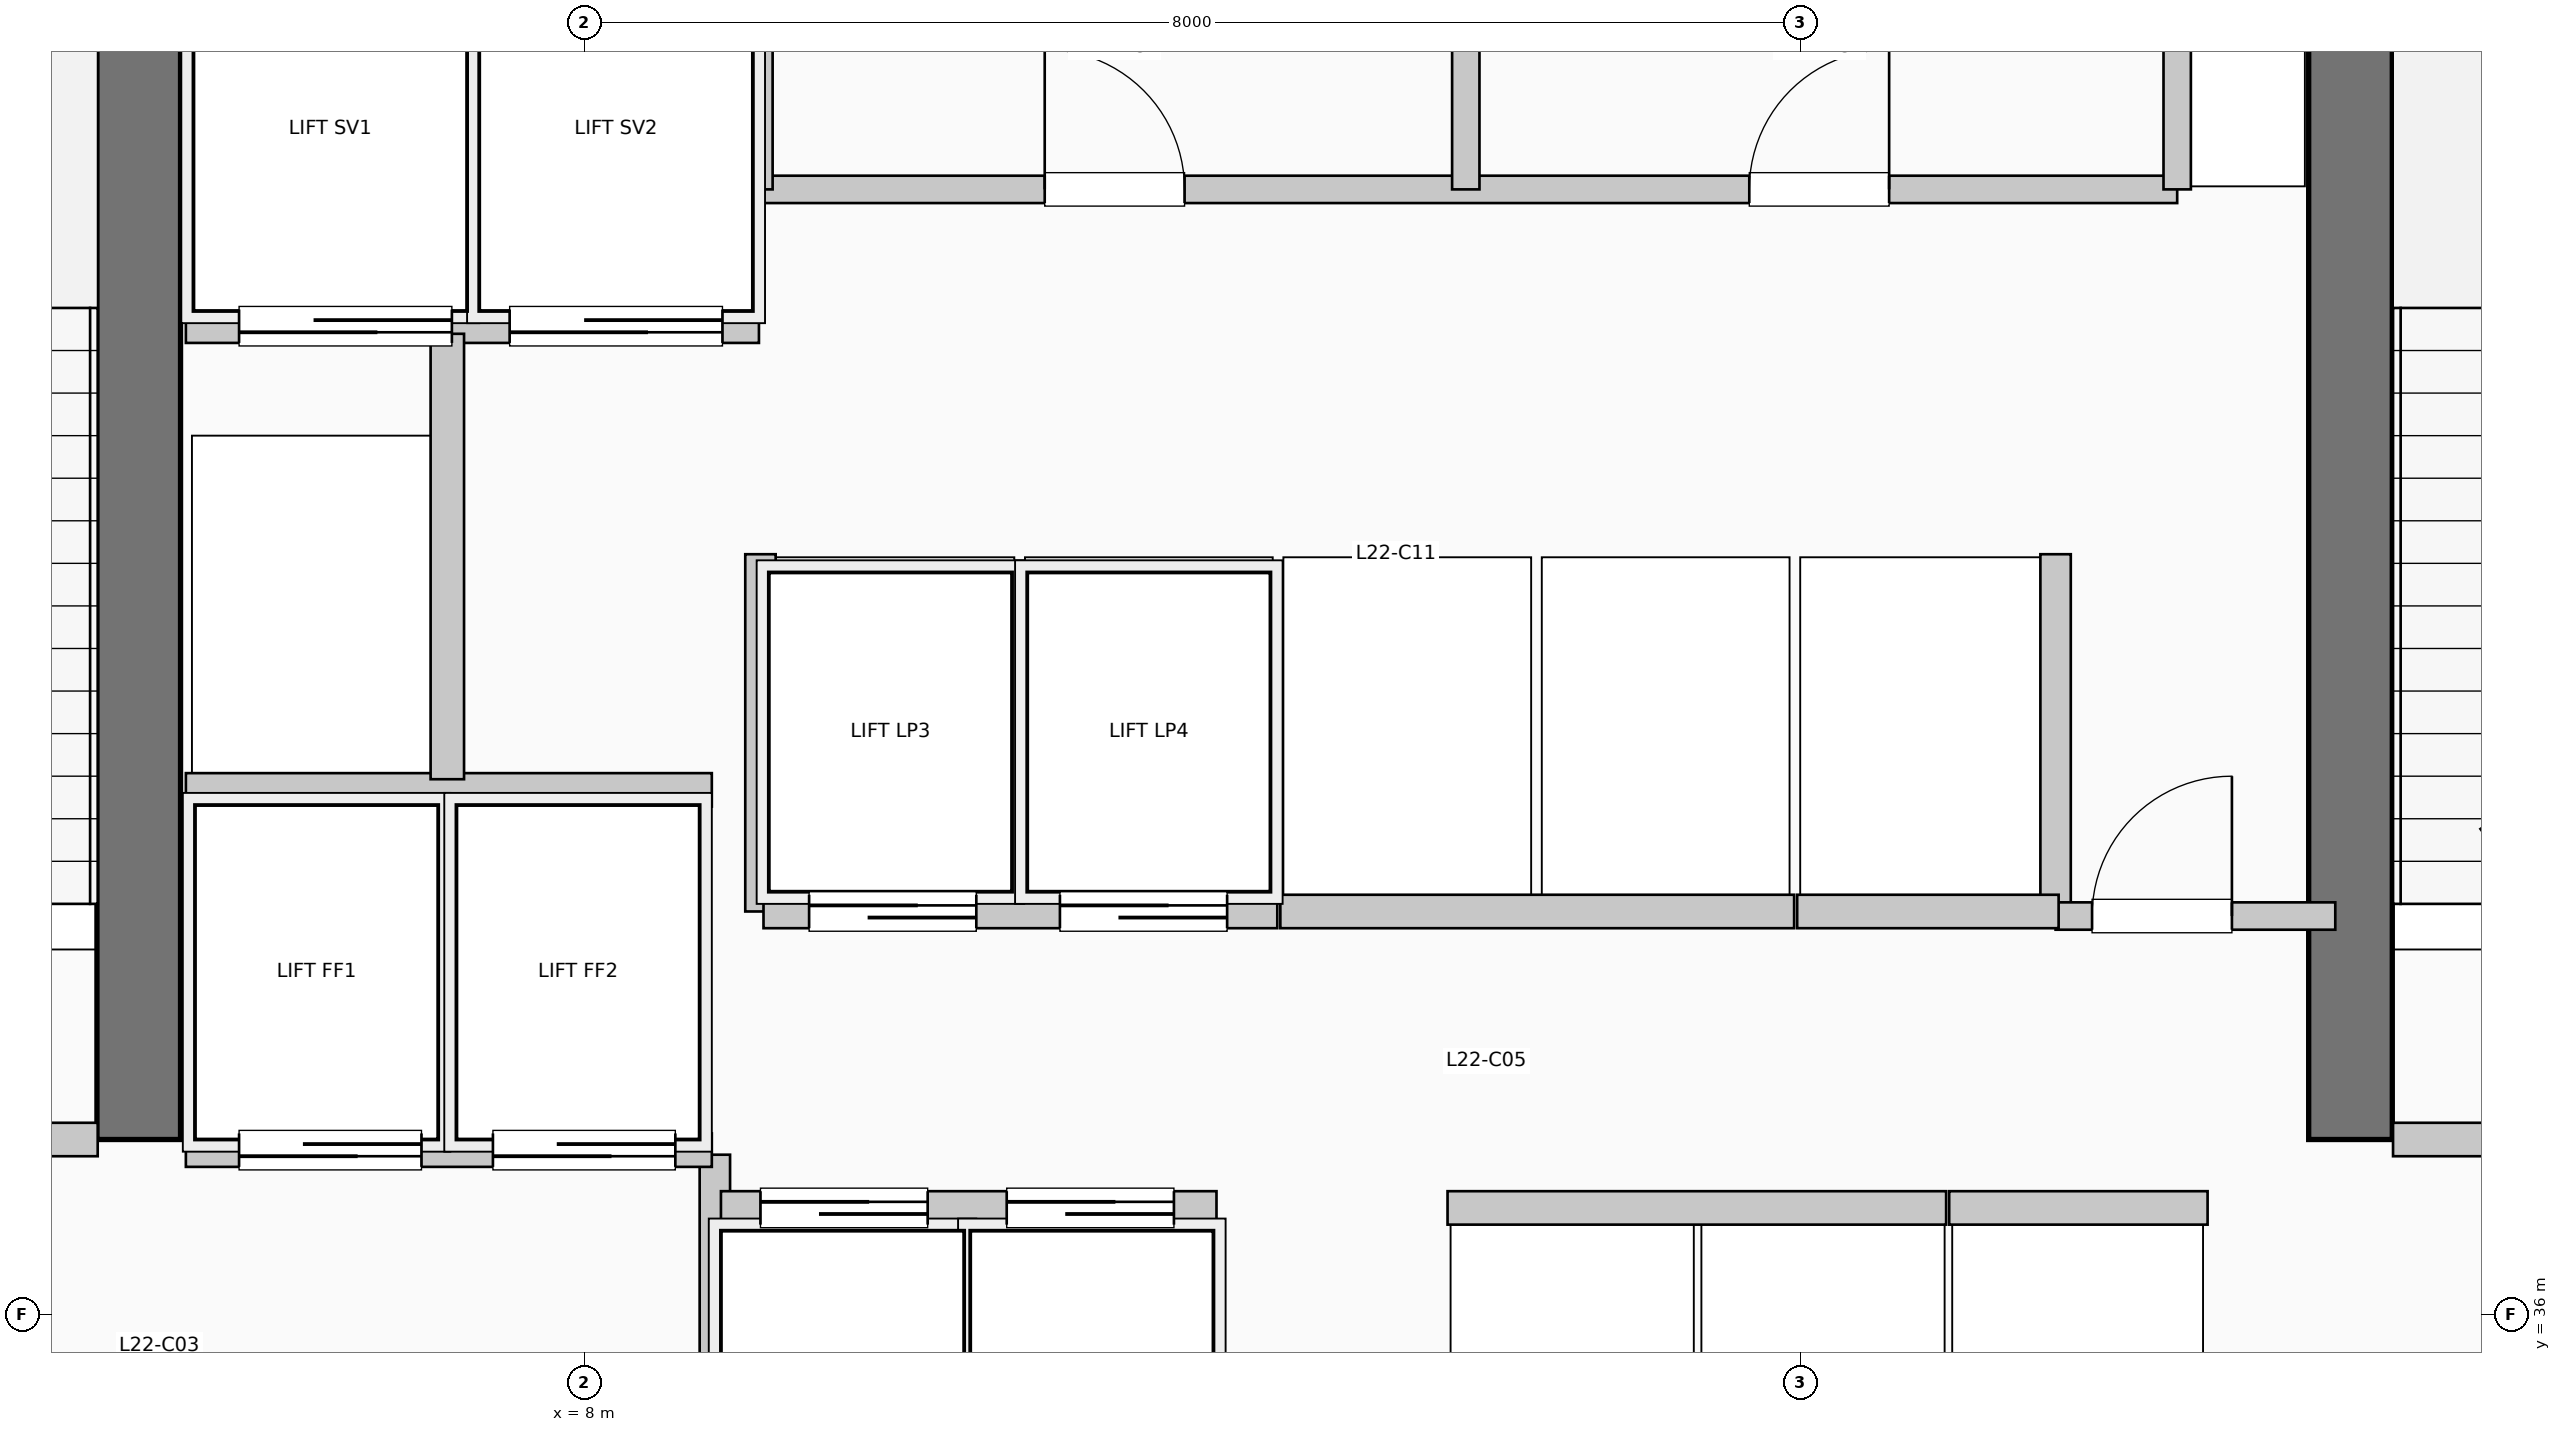
"""IFC4 building model, lengths in metres.
Left out: names, types, materials, properties, quantities, classifications, styles, units other than length and angle.
Written with IfcOpenShell. Run it as: python <this file> out.ifc"""

import sys

from ifc_helpers import new_model, si_unit, direction, frame, frame_2d, origin, place, context, subcontext, project, spatial, rectangle, extrude, element, fill, save


model = new_model("IFC4")
c1 = context("Model", 3, precision=1e-05, world=origin(), true_north=direction((0.0, 1.0)))
c2 = subcontext(c1, "Body", "Model", "MODEL_VIEW")
j1 = project(units=[si_unit("LENGTHUNIT", "METRE"), si_unit("PLANEANGLEUNIT", "RADIAN")], contexts=[c1])
p1 = place(None, origin())
s1 = spatial("IfcSite", under=j1, at=p1, CompositionType="ELEMENT")
p2 = place(p1, origin())
s2 = spatial("IfcBuilding", under=s1, at=p2, CompositionType="ELEMENT")
p3 = place(p2, frame((0.0, 0.0, 93.72)))
s3 = spatial("IfcBuildingStorey", under=s2, at=p3, CompositionType="ELEMENT", Elevation=93.72)
for number, where, z_axis, x_axis in (
    (1, (5.07, 37.15, 0.0), (0.0, 0.0, 1.0), (0.0, 1.0, 0.0)),
    (2, (19.62, 37.15, 0.0), (0.0, 0.0, 1.0), (0.0, 1.0, 0.0)),
):
    element("IfcWall", number, at=place(p3, frame(where, z_axis=z_axis, x_axis=x_axis)), inside=s3, PredefinedType="SHEAR", context=c2, shape_type="SweptSolid", body=[
        extrude(rectangle(XDim=7.89, YDim=0.55, at=frame_2d((3.945, 0.0))), origin(), (0.0, 0.0, 1.0), 4.95),
    ])
p4 = place(p3, frame((1.65, 37.15, 0.0), z_axis=(0.0, 0.0, 1.0), x_axis=(1.0, 0.0, 0.0)))
e3 = element("IfcWall", 3, at=p4, inside=s3, PredefinedType="PARTITIONING", context=c2, shape_type="SweptSolid", body=[
    extrude(rectangle(XDim=3.15, YDim=0.22, at=frame_2d((1.575, 0.0))), origin(), (0.0, 0.0, 1.0), 4.7),
])
p5 = place(p4, frame((2.05, 0.0, 0.0), z_axis=(0.0, 0.0, 1.0), x_axis=(-1.0, 0.0, 0.0)))
e4 = element("IfcOpeningElement", 4, at=p5, cuts=e3, PredefinedType="OPENING", context=c2, shape_type="SweptSolid", body=[
    extrude(rectangle(XDim=1.05, YDim=2.15, at=frame_2d((0.525, 1.075))), frame((0.0, 0.12, 0.0), z_axis=(0.0, -1.0, 0.0), x_axis=(1.0, 0.0, 0.0)), (0.0, 0.0, 1.0), 0.24),
])
p6 = place(p3, frame((8.86, 34.55, 0.0), z_axis=(0.0, 0.0, 1.0), x_axis=(0.0, 1.0, 0.0)))
e5 = element("IfcWall", 5, at=p6, inside=s3, PredefinedType="PARTITIONING", context=c2, shape_type="SweptSolid", body=[
    extrude(rectangle(XDim=2.5, YDim=0.2, at=frame_2d((1.25, 0.0))), origin(), (0.0, 0.0, 1.0), 4.7),
])
p7 = place(p3, frame((19.9, 37.15, 0.0), z_axis=(0.0, 0.0, 1.0), x_axis=(1.0, 0.0, 0.0)))
e6 = element("IfcWall", 6, at=p7, inside=s3, PredefinedType="PARTITIONING", context=c2, shape_type="SweptSolid", body=[
    extrude(rectangle(XDim=3.15, YDim=0.22, at=frame_2d((1.575, 0.0))), origin(), (0.0, 0.0, 1.0), 4.7),
])
p8 = place(p7, frame((2.05, 0.0, 0.0), z_axis=(0.0, 0.0, 1.0), x_axis=(-1.0, 0.0, 0.0)))
e7 = element("IfcOpeningElement", 7, at=p8, cuts=e6, PredefinedType="OPENING", context=c2, shape_type="SweptSolid", body=[
    extrude(rectangle(XDim=1.05, YDim=2.15, at=frame_2d((0.525, 1.075))), frame((0.0, 0.12, 0.0), z_axis=(0.0, -1.0, 0.0), x_axis=(1.0, 0.0, 0.0)), (0.0, 0.0, 1.0), 0.24),
])
p9 = place(p3, frame((5.38, 37.08, 0.0), z_axis=(0.0, 0.0, 1.0), x_axis=(1.0, 0.0, 0.0)))
e8 = element("IfcWall", 8, at=p9, inside=s3, PredefinedType="PARTITIONING", context=c2, shape_type="SweptSolid", body=[
    extrude(rectangle(XDim=3.46, YDim=0.22, at=frame_2d((1.73, 0.0))), origin(), (0.0, 0.0, 1.0), 4.7),
])
p10 = place(p9, frame((1.55, 0.0, 0.0), z_axis=(0.0, 0.0, 1.0), x_axis=(-1.0, 0.0, 0.0)))
e9 = element("IfcOpeningElement", 9, at=p10, cuts=e8, PredefinedType="OPENING", context=c2, shape_type="SweptSolid", body=[
    extrude(rectangle(XDim=1.2, YDim=2.2, at=frame_2d((0.6, 1.1))), frame((0.0, 0.12, 0.0), z_axis=(0.0, -1.0, 0.0), x_axis=(1.0, 0.0, 0.0)), (0.0, 0.0, 1.0), 0.24),
])
p11 = place(p9, frame((3.22, 0.0, 0.0), z_axis=(0.0, 0.0, 1.0), x_axis=(-1.0, 0.0, 0.0)))
e10 = element("IfcOpeningElement", 10, at=p11, cuts=e8, PredefinedType="OPENING", context=c2, shape_type="SweptSolid", body=[
    extrude(rectangle(XDim=1.2, YDim=2.2, at=frame_2d((0.6, 1.1))), frame((0.0, 0.12, 0.0), z_axis=(0.0, -1.0, 0.0), x_axis=(1.0, 0.0, 0.0)), (0.0, 0.0, 1.0), 0.24),
])
p12 = place(p3, frame((5.38, 39.45, 0.0), z_axis=(0.0, 0.0, 1.0), x_axis=(1.0, 0.0, 0.0)))
e11 = element("IfcWall", 11, at=p12, inside=s3, PredefinedType="PARTITIONING", context=c2, shape_type="SweptSolid", body=[
    extrude(rectangle(XDim=3.46, YDim=0.22, at=frame_2d((1.73, 0.0))), origin(), (0.0, 0.0, 1.0), 4.7),
])
p13 = place(p3, frame((5.38, 42.5, 0.0), z_axis=(0.0, 0.0, 1.0), x_axis=(1.0, 0.0, 0.0)))
e12 = element("IfcWall", 12, at=p13, inside=s3, PredefinedType="PARTITIONING", context=c2, shape_type="SweptSolid", body=[
    extrude(rectangle(XDim=3.77, YDim=0.22, at=frame_2d((1.885, 0.0))), origin(), (0.0, 0.0, 1.0), 4.7),
])
p14 = place(p13, frame((1.75, 0.0, 0.0), z_axis=(0.0, 0.0, 1.0), x_axis=(-1.0, 0.0, 0.0)))
e13 = element("IfcOpeningElement", 13, at=p14, cuts=e12, PredefinedType="OPENING", context=c2, shape_type="SweptSolid", body=[
    extrude(rectangle(XDim=1.4, YDim=2.2, at=frame_2d((0.7, 1.1))), frame((0.0, 0.12, 0.0), z_axis=(0.0, -1.0, 0.0), x_axis=(1.0, 0.0, 0.0)), (0.0, 0.0, 1.0), 0.24),
])
p15 = place(p13, frame((3.53, 0.0, 0.0), z_axis=(0.0, 0.0, 1.0), x_axis=(-1.0, 0.0, 0.0)))
e14 = element("IfcOpeningElement", 14, at=p15, cuts=e12, PredefinedType="OPENING", context=c2, shape_type="SweptSolid", body=[
    extrude(rectangle(XDim=1.4, YDim=2.2, at=frame_2d((0.7, 1.1))), frame((0.0, 0.12, 0.0), z_axis=(0.0, -1.0, 0.0), x_axis=(1.0, 0.0, 0.0)), (0.0, 0.0, 1.0), 0.24),
])
p16 = place(p3, frame((7.1, 39.52, 0.0), z_axis=(0.0, 0.0, 1.0), x_axis=(0.0, 1.0, 0.0)))
e15 = element("IfcWall", 15, at=p16, inside=s3, PredefinedType="PARTITIONING", context=c2, shape_type="SweptSolid", body=[
    extrude(rectangle(XDim=2.93, YDim=0.22, at=frame_2d((1.465, 0.0))), origin(), (0.0, 0.0, 1.0), 4.7),
])
for number, where, z_axis, x_axis in (
    (16, (9.16, 38.65, 0.0), (0.0, 0.0, 1.0), (0.0, 1.0, 0.0)),
    (17, (17.68, 38.65, 0.0), (0.0, 0.0, 1.0), (0.0, 1.0, 0.0)),
):
    element("IfcWall", number, at=place(p3, frame(where, z_axis=z_axis, x_axis=x_axis)), inside=s3, PredefinedType="PARTITIONING", context=c2, shape_type="SweptSolid", body=[
        extrude(rectangle(XDim=2.35, YDim=0.2, at=frame_2d((1.175, 0.0))), origin(), (0.0, 0.0, 1.0), 4.7),
    ])
p17 = place(p3, frame((17.68, 38.62, 0.0), z_axis=(0.0, 0.0, 1.0), x_axis=(1.0, 0.0, 0.0)))
e18 = element("IfcWall", 18, at=p17, inside=s3, PredefinedType="PARTITIONING", context=c2, shape_type="SweptSolid", body=[
    extrude(rectangle(XDim=1.84, YDim=0.18, at=frame_2d((0.92, 0.0))), origin(), (0.0, 0.0, 1.0), 4.7),
])
p18 = place(p17, frame((0.24, 0.0, 0.0)))
e19 = element("IfcOpeningElement", 19, at=p18, cuts=e18, PredefinedType="OPENING", context=c2, shape_type="SweptSolid", body=[
    extrude(rectangle(XDim=0.92, YDim=2.1, at=frame_2d((0.46, 1.05))), frame((0.0, 0.1, 0.0), z_axis=(0.0, -1.0, 0.0), x_axis=(1.0, 0.0, 0.0)), (0.0, 0.0, 1.0), 0.2),
])
p19 = place(p3, frame((8.9, 36.7, 0.0), z_axis=(0.0, 0.0, 1.0), x_axis=(1.0, 0.0, 0.0)))
e20 = element("IfcWall", 20, at=p19, inside=s3, PredefinedType="PARTITIONING", context=c2, shape_type="SweptSolid", body=[
    extrude(rectangle(XDim=3.26, YDim=0.22, at=frame_2d((1.63, 0.0))), origin(), (0.0, 0.0, 1.0), 4.7),
])
p20 = place(p19, frame((0.26, 0.0, 0.0)))
e21 = element("IfcOpeningElement", 21, at=p20, cuts=e20, PredefinedType="OPENING", context=c2, shape_type="SweptSolid", body=[
    extrude(rectangle(XDim=1.1, YDim=2.2, at=frame_2d((0.55, 1.1))), frame((0.0, 0.12, 0.0), z_axis=(0.0, -1.0, 0.0), x_axis=(1.0, 0.0, 0.0)), (0.0, 0.0, 1.0), 0.24),
])
p21 = place(p19, frame((1.88, 0.0, 0.0)))
e22 = element("IfcOpeningElement", 22, at=p21, cuts=e20, PredefinedType="OPENING", context=c2, shape_type="SweptSolid", body=[
    extrude(rectangle(XDim=1.1, YDim=2.2, at=frame_2d((0.55, 1.1))), frame((0.0, 0.12, 0.0), z_axis=(0.0, -1.0, 0.0), x_axis=(1.0, 0.0, 0.0)), (0.0, 0.0, 1.0), 0.24),
])
p22 = place(p3, frame((9.18, 38.65, 0.0), z_axis=(0.0, 0.0, 1.0), x_axis=(1.0, 0.0, 0.0)))
e23 = element("IfcWall", 23, at=p22, inside=s3, PredefinedType="PARTITIONING", context=c2, shape_type="SweptSolid", body=[
    extrude(rectangle(XDim=3.38, YDim=0.22, at=frame_2d((1.69, 0.0))), origin(), (0.0, 0.0, 1.0), 4.7),
])
p23 = place(p22, frame((0.3, 0.0, 0.0)))
e24 = element("IfcOpeningElement", 24, at=p23, cuts=e23, PredefinedType="OPENING", context=c2, shape_type="SweptSolid", body=[
    extrude(rectangle(XDim=1.1, YDim=2.2, at=frame_2d((0.55, 1.1))), frame((0.0, 0.12, 0.0), z_axis=(0.0, -1.0, 0.0), x_axis=(1.0, 0.0, 0.0)), (0.0, 0.0, 1.0), 0.24),
])
p24 = place(p22, frame((1.95, 0.0, 0.0)))
e25 = element("IfcOpeningElement", 25, at=p24, cuts=e23, PredefinedType="OPENING", context=c2, shape_type="SweptSolid", body=[
    extrude(rectangle(XDim=1.1, YDim=2.2, at=frame_2d((0.55, 1.1))), frame((0.0, 0.12, 0.0), z_axis=(0.0, -1.0, 0.0), x_axis=(1.0, 0.0, 0.0)), (0.0, 0.0, 1.0), 0.24),
])
p25 = place(p3, frame((13.68, 36.7, 0.0), z_axis=(0.0, 0.0, 1.0), x_axis=(1.0, 0.0, 0.0)))
e26 = element("IfcWall", 26, at=p25, inside=s3, PredefinedType="PARTITIONING", context=c2, shape_type="SweptSolid", body=[
    extrude(rectangle(XDim=3.28, YDim=0.22, at=frame_2d((1.64, 0.0))), origin(), (0.0, 0.0, 1.0), 4.7),
])
p26 = place(p3, frame((12.58, 38.65, 0.0), z_axis=(0.0, 0.0, 1.0), x_axis=(1.0, 0.0, 0.0)))
e27 = element("IfcWall", 27, at=p26, inside=s3, PredefinedType="PARTITIONING", context=c2, shape_type="SweptSolid", body=[
    extrude(rectangle(XDim=3.38, YDim=0.22, at=frame_2d((1.69, 0.0))), origin(), (0.0, 0.0, 1.0), 4.7),
])
p27 = place(p3, frame((16.98, 36.7, 0.0), z_axis=(0.0, 0.0, 1.0), x_axis=(1.0, 0.0, 0.0)))
e28 = element("IfcWall", 28, at=p27, inside=s3, PredefinedType="PARTITIONING", context=c2, shape_type="SweptSolid", body=[
    extrude(rectangle(XDim=1.7, YDim=0.22, at=frame_2d((0.85, 0.0))), origin(), (0.0, 0.0, 1.0), 4.7),
])
p28 = place(p3, frame((15.98, 38.65, 0.0), z_axis=(0.0, 0.0, 1.0), x_axis=(1.0, 0.0, 0.0)))
e29 = element("IfcWall", 29, at=p28, inside=s3, PredefinedType="PARTITIONING", context=c2, shape_type="SweptSolid", body=[
    extrude(rectangle(XDim=1.72, YDim=0.22, at=frame_2d((0.86, 0.0))), origin(), (0.0, 0.0, 1.0), 4.7),
])
p29 = place(p3, frame((9.15, 43.4, 0.0), z_axis=(0.0, 0.0, 1.0), x_axis=(1.0, 0.0, 0.0)))
e30 = element("IfcWall", 30, at=p29, inside=s3, PredefinedType="PLUMBINGWALL", context=c2, shape_type="SweptSolid", body=[
    extrude(rectangle(XDim=9.33, YDim=0.18, at=frame_2d((4.665, 0.0))), origin(), (0.0, 0.0, 1.0), 4.7),
])
p30 = place(p29, frame((1.88, 0.0, 0.0)))
e31 = element("IfcOpeningElement", 31, at=p30, cuts=e30, PredefinedType="OPENING", context=c2, shape_type="SweptSolid", body=[
    extrude(rectangle(XDim=0.92, YDim=2.1, at=frame_2d((0.46, 1.05))), frame((0.0, 0.1, 0.0), z_axis=(0.0, -1.0, 0.0), x_axis=(1.0, 0.0, 0.0)), (0.0, 0.0, 1.0), 0.2),
])
p31 = place(p29, frame((6.515, 0.0, 0.0)))
e32 = element("IfcOpeningElement", 32, at=p31, cuts=e30, PredefinedType="OPENING", context=c2, shape_type="SweptSolid", body=[
    extrude(rectangle(XDim=0.92, YDim=2.1, at=frame_2d((0.46, 1.05))), frame((0.0, 0.1, 0.0), z_axis=(0.0, -1.0, 0.0), x_axis=(1.0, 0.0, 0.0)), (0.0, 0.0, 1.0), 0.2),
])
for number, where, z_axis, x_axis in (
    (33, (9.15, 43.4, 0.0), (0.0, 0.0, 1.0), (0.0, 1.0, 0.0)),
    (34, (18.48, 43.4, 0.0), (0.0, 0.0, 1.0), (0.0, 1.0, 0.0)),
    (35, (13.8, 43.4, 0.0), (0.0, 0.0, 1.0), (0.0, 1.0, 0.0)),
):
    element("IfcWall", number, at=place(p3, frame(where, z_axis=z_axis, x_axis=x_axis)), inside=s3, PredefinedType="PLUMBINGWALL", context=c2, shape_type="SweptSolid", body=[
        extrude(rectangle(XDim=1.88, YDim=0.18, at=frame_2d((0.94, 0.0))), origin(), (0.0, 0.0, 1.0), 4.7),
    ])
p32 = place(p10, origin())
e36 = element("IfcDoor", 36, at=p32, inside=s3, OperationType="SLIDING_TO_RIGHT", PredefinedType="DOOR", context=c2, shape_type="SweptSolid", body=[
    extrude(rectangle(XDim=1.2, YDim=2.2, at=frame_2d((0.6, 1.1))), frame((0.0, 0.025, 0.0), z_axis=(0.0, -1.0, 0.0), x_axis=(1.0, 0.0, 0.0)), (0.0, 0.0, 1.0), 0.05),
])
fill(e9, e36)
p33 = place(p11, origin())
e37 = element("IfcDoor", 37, at=p33, inside=s3, OperationType="SLIDING_TO_RIGHT", PredefinedType="DOOR", context=c2, shape_type="SweptSolid", body=[
    extrude(rectangle(XDim=1.2, YDim=2.2, at=frame_2d((0.6, 1.1))), frame((0.0, 0.025, 0.0), z_axis=(0.0, -1.0, 0.0), x_axis=(1.0, 0.0, 0.0)), (0.0, 0.0, 1.0), 0.05),
])
fill(e10, e37)
p34 = place(p14, origin())
e38 = element("IfcDoor", 38, at=p34, inside=s3, OperationType="SLIDING_TO_LEFT", PredefinedType="DOOR", context=c2, shape_type="SweptSolid", body=[
    extrude(rectangle(XDim=1.4, YDim=2.2, at=frame_2d((0.7, 1.1))), frame((0.0, 0.025, 0.0), z_axis=(0.0, -1.0, 0.0), x_axis=(1.0, 0.0, 0.0)), (0.0, 0.0, 1.0), 0.05),
])
fill(e13, e38)
p35 = place(p15, origin())
e39 = element("IfcDoor", 39, at=p35, inside=s3, OperationType="SLIDING_TO_LEFT", PredefinedType="DOOR", context=c2, shape_type="SweptSolid", body=[
    extrude(rectangle(XDim=1.4, YDim=2.2, at=frame_2d((0.7, 1.1))), frame((0.0, 0.025, 0.0), z_axis=(0.0, -1.0, 0.0), x_axis=(1.0, 0.0, 0.0)), (0.0, 0.0, 1.0), 0.05),
])
fill(e14, e39)
p36 = place(p18, origin())
e40 = element("IfcDoor", 40, at=p36, inside=s3, OperationType="SINGLE_SWING_RIGHT", PredefinedType="DOOR", context=c2, shape_type="SweptSolid", body=[
    extrude(rectangle(XDim=0.92, YDim=2.1, at=frame_2d((0.46, 1.05))), frame((0.0, 0.025, 0.0), z_axis=(0.0, -1.0, 0.0), x_axis=(1.0, 0.0, 0.0)), (0.0, 0.0, 1.0), 0.05),
])
fill(e19, e40)
p37 = place(p20, origin())
e41 = element("IfcDoor", 41, at=p37, inside=s3, OperationType="SLIDING_TO_LEFT", PredefinedType="DOOR", context=c2, shape_type="SweptSolid", body=[
    extrude(rectangle(XDim=1.1, YDim=2.2, at=frame_2d((0.55, 1.1))), frame((0.0, 0.025, 0.0), z_axis=(0.0, -1.0, 0.0), x_axis=(1.0, 0.0, 0.0)), (0.0, 0.0, 1.0), 0.05),
])
fill(e21, e41)
p38 = place(p21, origin())
e42 = element("IfcDoor", 42, at=p38, inside=s3, OperationType="SLIDING_TO_LEFT", PredefinedType="DOOR", context=c2, shape_type="SweptSolid", body=[
    extrude(rectangle(XDim=1.1, YDim=2.2, at=frame_2d((0.55, 1.1))), frame((0.0, 0.025, 0.0), z_axis=(0.0, -1.0, 0.0), x_axis=(1.0, 0.0, 0.0)), (0.0, 0.0, 1.0), 0.05),
])
fill(e22, e42)
p39 = place(p23, origin())
e43 = element("IfcDoor", 43, at=p39, inside=s3, OperationType="SLIDING_TO_LEFT", PredefinedType="DOOR", context=c2, shape_type="SweptSolid", body=[
    extrude(rectangle(XDim=1.1, YDim=2.2, at=frame_2d((0.55, 1.1))), frame((0.0, 0.025, 0.0), z_axis=(0.0, -1.0, 0.0), x_axis=(1.0, 0.0, 0.0)), (0.0, 0.0, 1.0), 0.05),
])
fill(e24, e43)
p40 = place(p24, origin())
e44 = element("IfcDoor", 44, at=p40, inside=s3, OperationType="SLIDING_TO_LEFT", PredefinedType="DOOR", context=c2, shape_type="SweptSolid", body=[
    extrude(rectangle(XDim=1.1, YDim=2.2, at=frame_2d((0.55, 1.1))), frame((0.0, 0.025, 0.0), z_axis=(0.0, -1.0, 0.0), x_axis=(1.0, 0.0, 0.0)), (0.0, 0.0, 1.0), 0.05),
])
fill(e25, e44)
p41 = place(p30, origin())
e45 = element("IfcDoor", 45, at=p41, inside=s3, OperationType="SINGLE_SWING_LEFT", PredefinedType="DOOR", context=c2, shape_type="SweptSolid", body=[
    extrude(rectangle(XDim=0.92, YDim=2.1, at=frame_2d((0.46, 1.05))), frame((0.0, 0.025, 0.0), z_axis=(0.0, -1.0, 0.0), x_axis=(1.0, 0.0, 0.0)), (0.0, 0.0, 1.0), 0.05),
])
fill(e31, e45)
p42 = place(p31, origin())
e46 = element("IfcDoor", 46, at=p42, inside=s3, OperationType="SINGLE_SWING_RIGHT", PredefinedType="DOOR", context=c2, shape_type="SweptSolid", body=[
    extrude(rectangle(XDim=0.92, YDim=2.1, at=frame_2d((0.46, 1.05))), frame((0.0, 0.025, 0.0), z_axis=(0.0, -1.0, 0.0), x_axis=(1.0, 0.0, 0.0)), (0.0, 0.0, 1.0), 0.05),
])
fill(e32, e46)
save(model, sys.argv[1])
